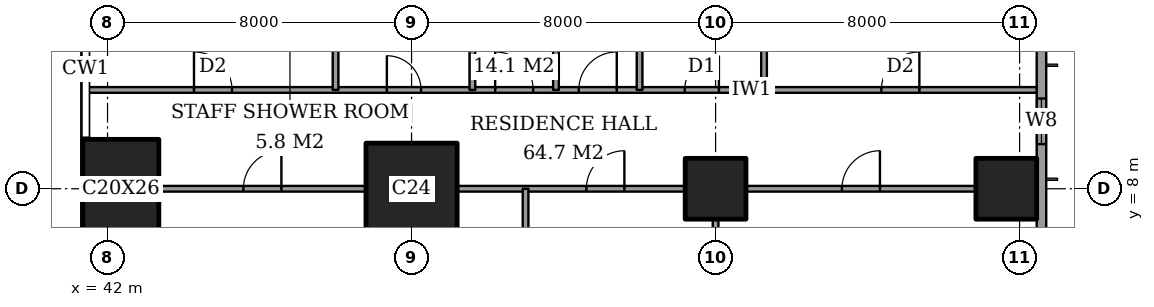
"""IFC4 building model, lengths in metres.
Left out: names, types, materials, properties, quantities, classifications, styles, units other than length and angle.
Written with IfcOpenShell. Run it as: python <this file> out.ifc"""

import sys

from ifc_helpers import new_model, si_unit, direction, frame, frame_2d, origin, origin_2d, place, context, subcontext, project, spatial, rectangle, extrude, element, fill, save


model = new_model("IFC4")
c1 = context("Model", 3, precision=1e-05, world=origin(), true_north=direction((0.0, 1.0)))
c2 = subcontext(c1, "Body", "Model", "MODEL_VIEW")
j1 = project(units=[si_unit("LENGTHUNIT", "METRE"), si_unit("PLANEANGLEUNIT", "RADIAN")], contexts=[c1])
p1 = place(None, origin())
s1 = spatial("IfcSite", under=j1, at=p1, CompositionType="ELEMENT")
p2 = place(p1, origin())
s2 = spatial("IfcBuilding", under=s1, at=p2, CompositionType="ELEMENT")
p3 = place(p2, frame((0.0, 0.0, 273.6)))
s3 = spatial("IfcBuildingStorey", under=s2, at=p3, CompositionType="ELEMENT", Elevation=273.6)
p4 = place(p3, frame((42.35, 8.0, 0.0), z_axis=(0.0, 0.0, 1.0), x_axis=(1.0, 0.0, 0.0)))
e1 = element("IfcColumn", 1, at=p4, inside=s3, PredefinedType="COLUMN", context=c2, shape_type="SweptSolid", body=[
    extrude(rectangle(XDim=2.0, YDim=2.6, at=origin_2d()), origin(), (0.0, 0.0, 1.0), 3.6),
])
p5 = place(p3, frame((50.0, 8.0, 0.0), z_axis=(0.0, 0.0, 1.0), x_axis=(1.0, 0.0, 0.0)))
e2 = element("IfcColumn", 2, at=p5, inside=s3, PredefinedType="COLUMN", context=c2, shape_type="SweptSolid", body=[
    extrude(rectangle(XDim=2.4, YDim=2.4, at=origin_2d()), origin(), (0.0, 0.0, 1.0), 3.6),
])
for number, where, z_axis, x_axis in (
    (3, (58.0, 8.0, 0.0), (0.0, 0.0, 1.0), (1.0, 0.0, 0.0)),
    (4, (65.65, 8.0, 0.0), (0.0, 0.0, 1.0), (1.0, 0.0, 0.0)),
):
    element("IfcColumn", number, at=place(p3, frame(where, z_axis=z_axis, x_axis=x_axis)), inside=s3, PredefinedType="COLUMN", context=c2, shape_type="SweptSolid", body=[
        extrude(rectangle(XDim=1.6, YDim=1.6, at=origin_2d()), origin(), (0.0, 0.0, 1.0), 3.6),
    ])
p6 = place(p3, frame((66.575, 3.175, 0.0), z_axis=(0.0, 0.0, 1.0), x_axis=(0.0, 1.0, 0.0)))
e5 = element("IfcWall", 5, at=p6, inside=s3, PredefinedType="SOLIDWALL", context=c2, shape_type="SweptSolid", body=[
    extrude(rectangle(XDim=41.65, YDim=0.25, at=frame_2d((20.825, 0.0))), origin(), (0.0, 0.0, 1.0), 3.6),
])
p7 = place(p6, frame((0.875, 0.0, 0.6)))
e6 = element("IfcOpeningElement", 6, at=p7, cuts=e5, PredefinedType="OPENING", context=c2, shape_type="SweptSolid", body=[
    extrude(rectangle(XDim=2.4, YDim=2.0, at=frame_2d((1.2, 1.0))), frame((0.0, 0.135, 0.0), z_axis=(0.0, -1.0, 0.0), x_axis=(1.0, 0.0, 0.0)), (0.0, 0.0, 1.0), 0.27),
])
p8 = place(p6, frame((6.0, 0.0, 0.6)))
e7 = element("IfcOpeningElement", 7, at=p8, cuts=e5, PredefinedType="OPENING", context=c2, shape_type="SweptSolid", body=[
    extrude(rectangle(XDim=1.2, YDim=2.0, at=frame_2d((0.6, 1.0))), frame((0.0, 0.135, 0.0), z_axis=(0.0, -1.0, 0.0), x_axis=(1.0, 0.0, 0.0)), (0.0, 0.0, 1.0), 0.27),
])
p9 = place(p6, frame((8.525, 0.0, 0.6)))
e8 = element("IfcOpeningElement", 8, at=p9, cuts=e5, PredefinedType="OPENING", context=c2, shape_type="SweptSolid", body=[
    extrude(rectangle(XDim=2.4, YDim=2.0, at=frame_2d((1.2, 1.0))), frame((0.0, 0.135, 0.0), z_axis=(0.0, -1.0, 0.0), x_axis=(1.0, 0.0, 0.0)), (0.0, 0.0, 1.0), 0.27),
])
p10 = place(p6, frame((15.725, 0.0, 0.6)))
e9 = element("IfcOpeningElement", 9, at=p10, cuts=e5, PredefinedType="OPENING", context=c2, shape_type="SweptSolid", body=[
    extrude(rectangle(XDim=2.4, YDim=2.0, at=frame_2d((1.2, 1.0))), frame((0.0, 0.135, 0.0), z_axis=(0.0, -1.0, 0.0), x_axis=(1.0, 0.0, 0.0)), (0.0, 0.0, 1.0), 0.27),
])
p11 = place(p6, frame((23.625, 0.0, 0.6)))
e10 = element("IfcOpeningElement", 10, at=p11, cuts=e5, PredefinedType="OPENING", context=c2, shape_type="SweptSolid", body=[
    extrude(rectangle(XDim=2.4, YDim=2.0, at=frame_2d((1.2, 1.0))), frame((0.0, 0.135, 0.0), z_axis=(0.0, -1.0, 0.0), x_axis=(1.0, 0.0, 0.0)), (0.0, 0.0, 1.0), 0.27),
])
p12 = place(p6, frame((30.725, 0.0, 0.6)))
e11 = element("IfcOpeningElement", 11, at=p12, cuts=e5, PredefinedType="OPENING", context=c2, shape_type="SweptSolid", body=[
    extrude(rectangle(XDim=2.4, YDim=2.0, at=frame_2d((1.2, 1.0))), frame((0.0, 0.135, 0.0), z_axis=(0.0, -1.0, 0.0), x_axis=(1.0, 0.0, 0.0)), (0.0, 0.0, 1.0), 0.27),
])
p13 = place(p6, frame((34.525, 0.0, 0.6)))
e12 = element("IfcOpeningElement", 12, at=p13, cuts=e5, PredefinedType="OPENING", context=c2, shape_type="SweptSolid", body=[
    extrude(rectangle(XDim=1.2, YDim=2.0, at=frame_2d((0.6, 1.0))), frame((0.0, 0.135, 0.0), z_axis=(0.0, -1.0, 0.0), x_axis=(1.0, 0.0, 0.0)), (0.0, 0.0, 1.0), 0.27),
])
p14 = place(p6, frame((38.375, 0.0, 0.6)))
e13 = element("IfcOpeningElement", 13, at=p14, cuts=e5, PredefinedType="OPENING", context=c2, shape_type="SweptSolid", body=[
    extrude(rectangle(XDim=2.4, YDim=2.0, at=frame_2d((1.2, 1.0))), frame((0.0, 0.135, 0.0), z_axis=(0.0, -1.0, 0.0), x_axis=(1.0, 0.0, 0.0)), (0.0, 0.0, 1.0), 0.27),
])
p15 = place(p3, frame((43.35, 8.0, 0.0), z_axis=(0.0, 0.0, 1.0), x_axis=(1.0, 0.0, 0.0)))
e14 = element("IfcWall", 14, at=p15, inside=s3, PredefinedType="PARTITIONING", context=c2, shape_type="SweptSolid", body=[
    extrude(rectangle(XDim=5.45, YDim=0.15, at=frame_2d((2.725, 0.0))), origin(), (0.0, 0.0, 1.0), 3.25),
])
p16 = place(p15, frame((2.225, 0.0, 0.0)))
e15 = element("IfcOpeningElement", 15, at=p16, cuts=e14, PredefinedType="OPENING", context=c2, shape_type="SweptSolid", body=[
    extrude(rectangle(XDim=1.0, YDim=2.1, at=frame_2d((0.5, 1.05))), frame((0.0, 0.085, 0.0), z_axis=(0.0, -1.0, 0.0), x_axis=(1.0, 0.0, 0.0)), (0.0, 0.0, 1.0), 0.17),
])
p17 = place(p3, frame((51.2, 8.0, 0.0), z_axis=(0.0, 0.0, 1.0), x_axis=(1.0, 0.0, 0.0)))
e16 = element("IfcWall", 16, at=p17, inside=s3, PredefinedType="PARTITIONING", context=c2, shape_type="SweptSolid", body=[
    extrude(rectangle(XDim=6.0, YDim=0.15, at=frame_2d((3.0, 0.0))), origin(), (0.0, 0.0, 1.0), 3.25),
])
p18 = place(p17, frame((3.4, 0.0, 0.0)))
e17 = element("IfcOpeningElement", 17, at=p18, cuts=e16, PredefinedType="OPENING", context=c2, shape_type="SweptSolid", body=[
    extrude(rectangle(XDim=1.0, YDim=2.1, at=frame_2d((0.5, 1.05))), frame((0.0, 0.085, 0.0), z_axis=(0.0, -1.0, 0.0), x_axis=(1.0, 0.0, 0.0)), (0.0, 0.0, 1.0), 0.17),
])
p19 = place(p3, frame((58.8, 8.0, 0.0), z_axis=(0.0, 0.0, 1.0), x_axis=(1.0, 0.0, 0.0)))
e18 = element("IfcWall", 18, at=p19, inside=s3, PredefinedType="PARTITIONING", context=c2, shape_type="SweptSolid", body=[
    extrude(rectangle(XDim=6.05, YDim=0.15, at=frame_2d((3.025, 0.0))), origin(), (0.0, 0.0, 1.0), 3.25),
])
p20 = place(p19, frame((2.525, 0.0, 0.0)))
e19 = element("IfcOpeningElement", 19, at=p20, cuts=e18, PredefinedType="OPENING", context=c2, shape_type="SweptSolid", body=[
    extrude(rectangle(XDim=1.0, YDim=2.1, at=frame_2d((0.5, 1.05))), frame((0.0, 0.085, 0.0), z_axis=(0.0, -1.0, 0.0), x_axis=(1.0, 0.0, 0.0)), (0.0, 0.0, 1.0), 0.17),
])
p21 = place(p3, frame((41.439, 10.6, 0.0), z_axis=(0.0, 0.0, 1.0), x_axis=(1.0, 0.0, 0.0)))
e20 = element("IfcWall", 20, at=p21, inside=s3, PredefinedType="PARTITIONING", context=c2, shape_type="SweptSolid", body=[
    extrude(rectangle(XDim=25.011, YDim=0.15, at=frame_2d((12.505, 0.0))), origin(), (0.0, 0.0, 1.0), 3.25),
])
p22 = place(p21, frame((10.761, 0.0, 0.0)))
e21 = element("IfcOpeningElement", 21, at=p22, cuts=e20, PredefinedType="OPENING", context=c2, shape_type="SweptSolid", body=[
    extrude(rectangle(XDim=1.0, YDim=2.1, at=frame_2d((0.5, 1.05))), frame((0.0, 0.085, 0.0), z_axis=(0.0, -1.0, 0.0), x_axis=(1.0, 0.0, 0.0)), (0.0, 0.0, 1.0), 0.17),
])
p23 = place(p21, frame((20.924, 0.0, 0.0)))
e22 = element("IfcOpeningElement", 22, at=p23, cuts=e20, PredefinedType="OPENING", context=c2, shape_type="SweptSolid", body=[
    extrude(rectangle(XDim=1.0, YDim=2.1, at=frame_2d((0.5, 1.05))), frame((0.0, 0.085, 0.0), z_axis=(0.0, -1.0, 0.0), x_axis=(1.0, 0.0, 0.0)), (0.0, 0.0, 1.0), 0.17),
])
p24 = place(p21, frame((15.749, 0.0, 0.0)))
e23 = element("IfcOpeningElement", 23, at=p24, cuts=e20, PredefinedType="OPENING", context=c2, shape_type="SweptSolid", body=[
    extrude(rectangle(XDim=0.9, YDim=2.1, at=frame_2d((0.45, 1.05))), frame((0.0, 0.085, 0.0), z_axis=(0.0, -1.0, 0.0), x_axis=(1.0, 0.0, 0.0)), (0.0, 0.0, 1.0), 0.17),
])
p25 = place(p21, frame((12.961, 0.0, 0.0)))
e24 = element("IfcOpeningElement", 24, at=p25, cuts=e20, PredefinedType="OPENING", context=c2, shape_type="SweptSolid", body=[
    extrude(rectangle(XDim=1.0, YDim=2.1, at=frame_2d((0.5, 1.05))), frame((0.0, 0.085, 0.0), z_axis=(0.0, -1.0, 0.0), x_axis=(1.0, 0.0, 0.0)), (0.0, 0.0, 1.0), 0.17),
])
p26 = place(p21, frame((7.911, 0.0, 0.0)))
e25 = element("IfcOpeningElement", 25, at=p26, cuts=e20, PredefinedType="OPENING", context=c2, shape_type="SweptSolid", body=[
    extrude(rectangle(XDim=0.9, YDim=2.1, at=frame_2d((0.45, 1.05))), frame((0.0, 0.085, 0.0), z_axis=(0.0, -1.0, 0.0), x_axis=(1.0, 0.0, 0.0)), (0.0, 0.0, 1.0), 0.17),
])
p27 = place(p21, frame((2.836, 0.0, 0.0)))
e26 = element("IfcOpeningElement", 26, at=p27, cuts=e20, PredefinedType="OPENING", context=c2, shape_type="SweptSolid", body=[
    extrude(rectangle(XDim=1.0, YDim=2.1, at=frame_2d((0.5, 1.05))), frame((0.0, 0.085, 0.0), z_axis=(0.0, -1.0, 0.0), x_axis=(1.0, 0.0, 0.0)), (0.0, 0.0, 1.0), 0.17),
])
for number, where, z_axis, x_axis in (
    (27, (48.0, 10.6, 0.0), (0.0, 0.0, 1.0), (0.0, 1.0, 0.0)),
    (28, (51.6, 10.6, 0.0), (0.0, 0.0, 1.0), (0.0, 1.0, 0.0)),
):
    element("IfcWall", number, at=place(p3, frame(where, z_axis=z_axis, x_axis=x_axis)), inside=s3, PredefinedType="PARTITIONING", context=c2, shape_type="SweptSolid", body=[
        extrude(rectangle(XDim=6.4, YDim=0.15, at=frame_2d((3.2, 0.0))), origin(), (0.0, 0.0, 1.0), 3.25),
    ])
p28 = place(p3, frame((53.0, -0.45, 0.0), z_axis=(0.0, 0.0, 1.0), x_axis=(0.0, 1.0, 0.0)))
e29 = element("IfcWall", 29, at=p28, inside=s3, PredefinedType="PARTITIONING", context=c2, shape_type="SweptSolid", body=[
    extrude(rectangle(XDim=8.45, YDim=0.15, at=frame_2d((4.225, 0.0))), origin(), (0.0, 0.0, 1.0), 3.25),
])
p29 = place(p3, frame((53.8, 10.6, 0.0), z_axis=(0.0, 0.0, 1.0), x_axis=(0.0, 1.0, 0.0)))
e30 = element("IfcWall", 30, at=p29, inside=s3, PredefinedType="PARTITIONING", context=c2, shape_type="SweptSolid", body=[
    extrude(rectangle(XDim=6.4, YDim=0.15, at=frame_2d((3.2, 0.0))), origin(), (0.0, 0.0, 1.0), 3.25),
])
p30 = place(p3, frame((56.0, 10.6, 0.0), z_axis=(0.0, 0.0, 1.0), x_axis=(0.0, 1.0, 0.0)))
e31 = element("IfcWall", 31, at=p30, inside=s3, PredefinedType="PARTITIONING", context=c2, shape_type="SweptSolid", body=[
    extrude(rectangle(XDim=11.0, YDim=0.15, at=frame_2d((5.5, 0.0))), origin(), (0.0, 0.0, 1.0), 3.25),
])
p31 = place(p30, frame((8.2, 0.0, 0.0)))
e32 = element("IfcOpeningElement", 32, at=p31, cuts=e31, PredefinedType="OPENING", context=c2, shape_type="SweptSolid", body=[
    extrude(rectangle(XDim=1.0, YDim=2.1, at=frame_2d((0.5, 1.05))), frame((0.0, 0.085, 0.0), z_axis=(0.0, -1.0, 0.0), x_axis=(1.0, 0.0, 0.0)), (0.0, 0.0, 1.0), 0.17),
])
p32 = place(p3, frame((58.0, 1.15, 0.0), z_axis=(0.0, 0.0, 1.0), x_axis=(0.0, 1.0, 0.0)))
e33 = element("IfcWall", 33, at=p32, inside=s3, PredefinedType="PARTITIONING", context=c2, shape_type="SweptSolid", body=[
    extrude(rectangle(XDim=6.05, YDim=0.15, at=frame_2d((3.025, 0.0))), origin(), (0.0, 0.0, 1.0), 3.25),
])
p33 = place(p3, frame((59.275, 10.6, 0.0), z_axis=(0.0, 0.0, 1.0), x_axis=(0.0, 1.0, 0.0)))
e34 = element("IfcWall", 34, at=p33, inside=s3, PredefinedType="PARTITIONING", context=c2, shape_type="SweptSolid", body=[
    extrude(rectangle(XDim=4.2, YDim=0.15, at=frame_2d((2.1, 0.0))), origin(), (0.0, 0.0, 1.0), 3.25),
])
p34 = place(p8, origin())
e35 = element("IfcWindow", 35, at=p34, inside=s3, PartitioningType="SINGLE_PANEL", PredefinedType="WINDOW", context=c2, shape_type="SweptSolid", body=[
    extrude(rectangle(XDim=1.2, YDim=2.0, at=frame_2d((0.6, 1.0))), frame((0.0, 0.03, 0.0), z_axis=(0.0, -1.0, 0.0), x_axis=(1.0, 0.0, 0.0)), (0.0, 0.0, 1.0), 0.06),
])
fill(e7, e35)
p35 = place(p20, origin())
e36 = element("IfcDoor", 36, at=p35, inside=s3, OperationType="SINGLE_SWING_LEFT", PredefinedType="DOOR", context=c2, shape_type="SweptSolid", body=[
    extrude(rectangle(XDim=1.0, YDim=2.1, at=frame_2d((0.5, 1.05))), frame((0.0, 0.025, 0.0), z_axis=(0.0, -1.0, 0.0), x_axis=(1.0, 0.0, 0.0)), (0.0, 0.0, 1.0), 0.05),
])
fill(e19, e36)
p36 = place(p18, origin())
e37 = element("IfcDoor", 37, at=p36, inside=s3, OperationType="SINGLE_SWING_LEFT", PredefinedType="DOOR", context=c2, shape_type="SweptSolid", body=[
    extrude(rectangle(XDim=1.0, YDim=2.1, at=frame_2d((0.5, 1.05))), frame((0.0, 0.025, 0.0), z_axis=(0.0, -1.0, 0.0), x_axis=(1.0, 0.0, 0.0)), (0.0, 0.0, 1.0), 0.05),
])
fill(e17, e37)
p37 = place(p16, origin())
e38 = element("IfcDoor", 38, at=p37, inside=s3, OperationType="SINGLE_SWING_LEFT", PredefinedType="DOOR", context=c2, shape_type="SweptSolid", body=[
    extrude(rectangle(XDim=1.0, YDim=2.1, at=frame_2d((0.5, 1.05))), frame((0.0, 0.025, 0.0), z_axis=(0.0, -1.0, 0.0), x_axis=(1.0, 0.0, 0.0)), (0.0, 0.0, 1.0), 0.05),
])
fill(e15, e38)
p38 = place(p22, origin())
e39 = element("IfcDoor", 39, at=p38, inside=s3, OperationType="SINGLE_SWING_RIGHT", PredefinedType="DOOR", context=c2, shape_type="SweptSolid", body=[
    extrude(rectangle(XDim=1.0, YDim=2.1, at=frame_2d((0.5, 1.05))), frame((0.0, 0.025, 0.0), z_axis=(0.0, -1.0, 0.0), x_axis=(1.0, 0.0, 0.0)), (0.0, 0.0, 1.0), 0.05),
])
fill(e21, e39)
p39 = place(p23, origin())
e40 = element("IfcDoor", 40, at=p39, inside=s3, OperationType="SINGLE_SWING_LEFT", PredefinedType="DOOR", context=c2, shape_type="SweptSolid", body=[
    extrude(rectangle(XDim=1.0, YDim=2.1, at=frame_2d((0.5, 1.05))), frame((0.0, 0.025, 0.0), z_axis=(0.0, -1.0, 0.0), x_axis=(1.0, 0.0, 0.0)), (0.0, 0.0, 1.0), 0.05),
])
fill(e22, e40)
p40 = place(p24, origin())
e41 = element("IfcDoor", 41, at=p40, inside=s3, OperationType="SINGLE_SWING_LEFT", PredefinedType="DOOR", context=c2, shape_type="SweptSolid", body=[
    extrude(rectangle(XDim=0.9, YDim=2.1, at=frame_2d((0.45, 1.05))), frame((0.0, 0.025, 0.0), z_axis=(0.0, -1.0, 0.0), x_axis=(1.0, 0.0, 0.0)), (0.0, 0.0, 1.0), 0.05),
])
fill(e23, e41)
p41 = place(p25, origin())
e42 = element("IfcDoor", 42, at=p41, inside=s3, OperationType="SINGLE_SWING_LEFT", PredefinedType="DOOR", context=c2, shape_type="SweptSolid", body=[
    extrude(rectangle(XDim=1.0, YDim=2.1, at=frame_2d((0.5, 1.05))), frame((0.0, 0.025, 0.0), z_axis=(0.0, -1.0, 0.0), x_axis=(1.0, 0.0, 0.0)), (0.0, 0.0, 1.0), 0.05),
])
fill(e24, e42)
p42 = place(p26, origin())
e43 = element("IfcDoor", 43, at=p42, inside=s3, OperationType="SINGLE_SWING_RIGHT", PredefinedType="DOOR", context=c2, shape_type="SweptSolid", body=[
    extrude(rectangle(XDim=0.9, YDim=2.1, at=frame_2d((0.45, 1.05))), frame((0.0, 0.025, 0.0), z_axis=(0.0, -1.0, 0.0), x_axis=(1.0, 0.0, 0.0)), (0.0, 0.0, 1.0), 0.05),
])
fill(e25, e43)
p43 = place(p27, origin())
e44 = element("IfcDoor", 44, at=p43, inside=s3, OperationType="SINGLE_SWING_RIGHT", PredefinedType="DOOR", context=c2, shape_type="SweptSolid", body=[
    extrude(rectangle(XDim=1.0, YDim=2.1, at=frame_2d((0.5, 1.05))), frame((0.0, 0.025, 0.0), z_axis=(0.0, -1.0, 0.0), x_axis=(1.0, 0.0, 0.0)), (0.0, 0.0, 1.0), 0.05),
])
fill(e26, e44)
save(model, sys.argv[1])
